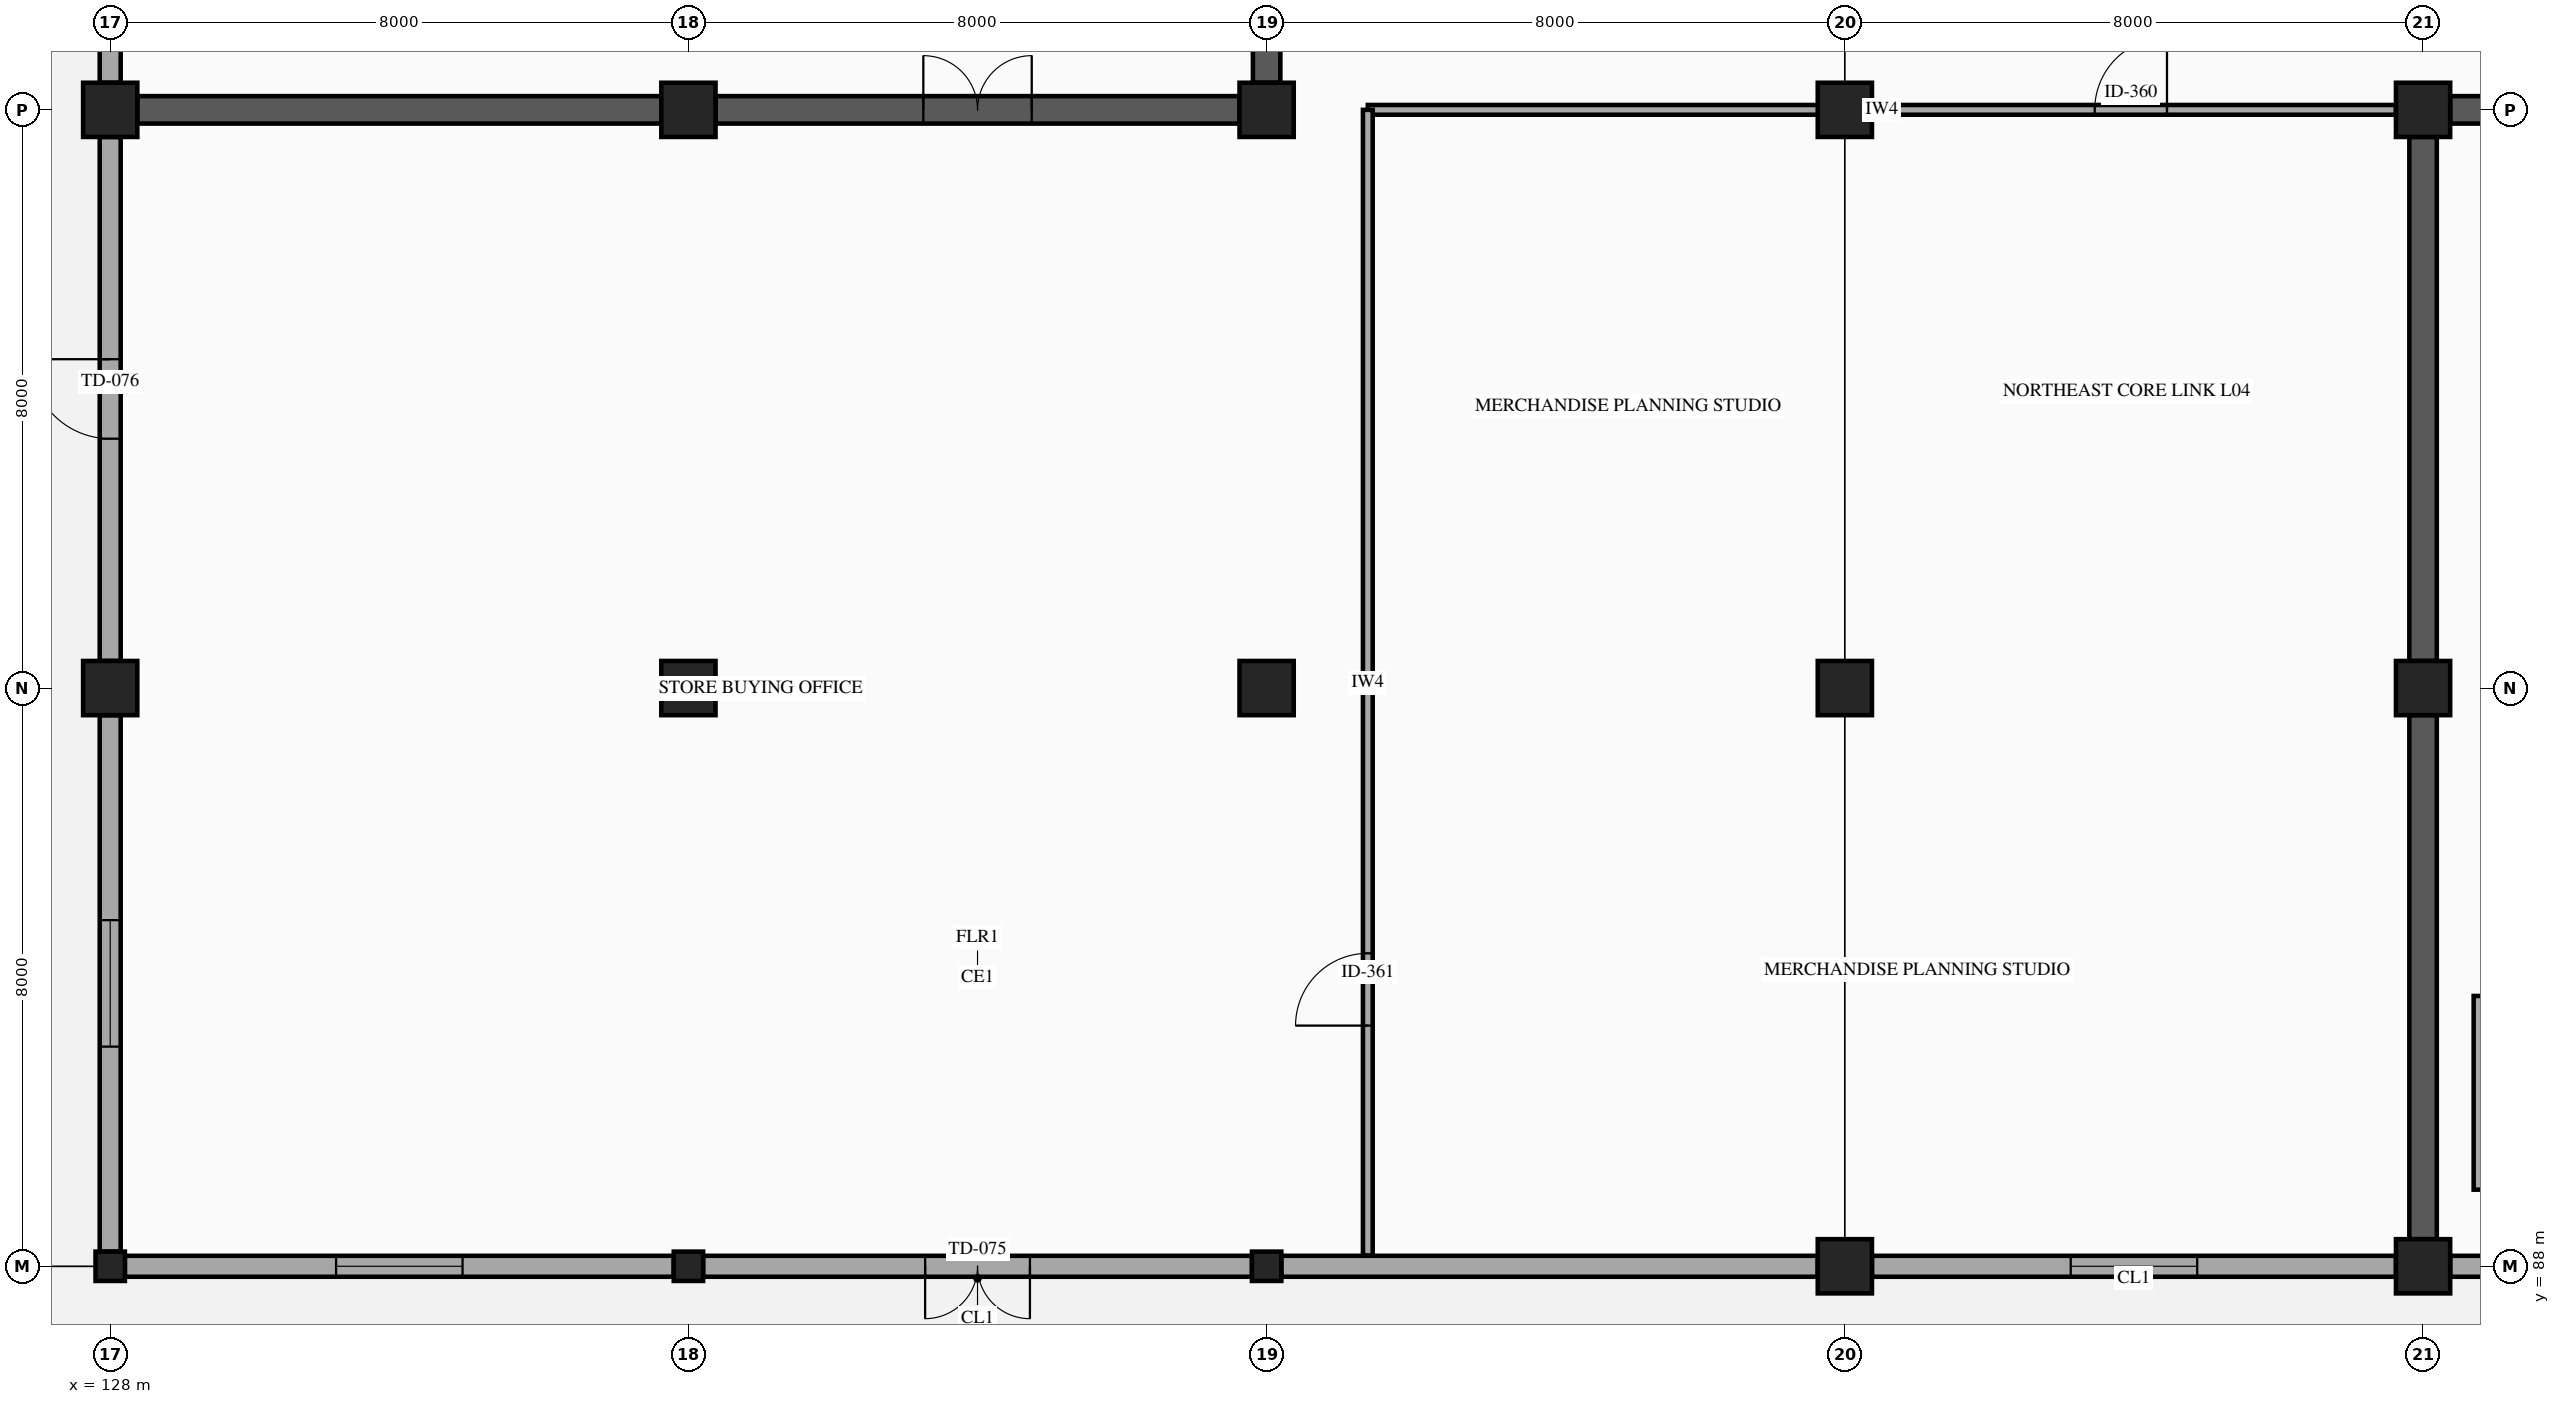
"""IFC4 building model, lengths in metres.
Left out: names, types, materials, properties, quantities, classifications, styles, units other than length and angle.
Written with IfcOpenShell. Run it as: python <this file> out.ifc"""

import sys

from ifc_helpers import new_model, si_unit, direction, frame, frame_2d, origin, origin_2d, place, context, subcontext, project, spatial, rectangle, hollow_circle, extrude, element, fill, save


model = new_model("IFC4")
c1 = context("Model", 3, precision=1e-05, world=origin(), true_north=direction((0.0, 1.0)))
c2 = subcontext(c1, "Body", "Model", "MODEL_VIEW")
j1 = project(units=[si_unit("LENGTHUNIT", "METRE"), si_unit("PLANEANGLEUNIT", "RADIAN")], contexts=[c1])
p1 = place(None, origin())
s1 = spatial("IfcSite", under=j1, at=p1, CompositionType="ELEMENT")
p2 = place(p1, origin())
s2 = spatial("IfcBuilding", under=s1, at=p2, CompositionType="ELEMENT")
p3 = place(p2, frame((0.0, 0.0, 19.4)))
s3 = spatial("IfcBuildingStorey", under=s2, at=p3, CompositionType="ELEMENT", Elevation=19.4)
p4 = place(p3, frame((128.0, 88.0, 0.0), z_axis=(0.0, 0.0, 1.0), x_axis=(1.0, 0.0, 0.0)))
e1 = element("IfcColumn", 1, at=p4, inside=s3, PredefinedType="COLUMN", context=c2, shape_type="SweptSolid", body=[
    extrude(hollow_circle(Radius=0.203, WallThickness=0.012, at=origin_2d()), origin(), (0.0, 0.0, 1.0), 4.5),
])
for number, where, z_axis, x_axis in (
    (2, (128.0, 96.0, 0.0), (0.0, 0.0, 1.0), (1.0, 0.0, 0.0)),
    (3, (128.0, 104.0, 0.0), (0.0, 0.0, 1.0), (1.0, 0.0, 0.0)),
):
    element("IfcColumn", number, at=place(p3, frame(where, z_axis=z_axis, x_axis=x_axis)), inside=s3, PredefinedType="COLUMN", context=c2, shape_type="SweptSolid", body=[
        extrude(rectangle(XDim=0.75, YDim=0.75, at=origin_2d()), origin(), (0.0, 0.0, 1.0), 4.5),
    ])
p5 = place(p3, frame((136.0, 88.0, 0.0), z_axis=(0.0, 0.0, 1.0), x_axis=(1.0, 0.0, 0.0)))
e4 = element("IfcColumn", 4, at=p5, inside=s3, PredefinedType="COLUMN", context=c2, shape_type="SweptSolid", body=[
    extrude(hollow_circle(Radius=0.203, WallThickness=0.012, at=origin_2d()), origin(), (0.0, 0.0, 1.0), 4.5),
])
for number, where, z_axis, x_axis in (
    (5, (136.0, 96.0, 0.0), (0.0, 0.0, 1.0), (1.0, 0.0, 0.0)),
    (6, (136.0, 104.0, 0.0), (0.0, 0.0, 1.0), (1.0, 0.0, 0.0)),
):
    element("IfcColumn", number, at=place(p3, frame(where, z_axis=z_axis, x_axis=x_axis)), inside=s3, PredefinedType="COLUMN", context=c2, shape_type="SweptSolid", body=[
        extrude(rectangle(XDim=0.75, YDim=0.75, at=origin_2d()), origin(), (0.0, 0.0, 1.0), 4.5),
    ])
p6 = place(p3, frame((144.0, 88.0, 0.0), z_axis=(0.0, 0.0, 1.0), x_axis=(1.0, 0.0, 0.0)))
e7 = element("IfcColumn", 7, at=p6, inside=s3, PredefinedType="COLUMN", context=c2, shape_type="SweptSolid", body=[
    extrude(hollow_circle(Radius=0.203, WallThickness=0.012, at=origin_2d()), origin(), (0.0, 0.0, 1.0), 4.5),
])
for number, where, z_axis, x_axis in (
    (8, (144.0, 96.0, 0.0), (0.0, 0.0, 1.0), (1.0, 0.0, 0.0)),
    (9, (144.0, 104.0, 0.0), (0.0, 0.0, 1.0), (1.0, 0.0, 0.0)),
    (10, (152.0, 88.0, 0.0), (0.0, 0.0, 1.0), (1.0, 0.0, 0.0)),
    (11, (152.0, 96.0, 0.0), (0.0, 0.0, 1.0), (1.0, 0.0, 0.0)),
    (12, (152.0, 104.0, 0.0), (0.0, 0.0, 1.0), (1.0, 0.0, 0.0)),
    (13, (160.0, 88.0, 0.0), (0.0, 0.0, 1.0), (1.0, 0.0, 0.0)),
    (14, (160.0, 96.0, 0.0), (0.0, 0.0, 1.0), (1.0, 0.0, 0.0)),
    (15, (160.0, 104.0, 0.0), (0.0, 0.0, 1.0), (1.0, 0.0, 0.0)),
):
    element("IfcColumn", number, at=place(p3, frame(where, z_axis=z_axis, x_axis=x_axis)), inside=s3, PredefinedType="COLUMN", context=c2, shape_type="SweptSolid", body=[
        extrude(rectangle(XDim=0.75, YDim=0.75, at=origin_2d()), origin(), (0.0, 0.0, 1.0), 4.5),
    ])
p7 = place(p3, frame((167.625, 88.0, 0.0), z_axis=(0.0, 0.0, 1.0), x_axis=(-1.0, 0.0, 0.0)))
e16 = element("IfcWall", 16, at=p7, inside=s3, PredefinedType="STANDARD", context=c2, shape_type="SweptSolid", body=[
    extrude(rectangle(XDim=7.25, YDim=0.29, at=frame_2d((3.625, 0.0))), origin(), (0.0, 0.0, 1.0), 3.48),
])
p8 = place(p3, frame((159.625, 88.0, 0.0), z_axis=(0.0, 0.0, 1.0), x_axis=(-1.0, 0.0, 0.0)))
e17 = element("IfcWall", 17, at=p8, inside=s3, PredefinedType="STANDARD", context=c2, shape_type="SweptSolid", body=[
    extrude(rectangle(XDim=7.25, YDim=0.29, at=frame_2d((3.625, 0.0))), origin(), (0.0, 0.0, 1.0), 3.48),
])
p9 = place(p8, frame((2.75, 0.0, 0.8)))
e18 = element("IfcOpeningElement", 18, at=p9, cuts=e17, PredefinedType="OPENING", context=c2, shape_type="SweptSolid", body=[
    extrude(rectangle(XDim=1.75, YDim=1.5, at=frame_2d((0.875, 0.75))), frame((0.0, 0.155, 0.0), z_axis=(0.0, -1.0, 0.0), x_axis=(1.0, 0.0, 0.0)), (0.0, 0.0, 1.0), 0.31),
])
p10 = place(p3, frame((151.625, 88.0, 0.0), z_axis=(0.0, 0.0, 1.0), x_axis=(-1.0, 0.0, 0.0)))
e19 = element("IfcWall", 19, at=p10, inside=s3, PredefinedType="STANDARD", context=c2, shape_type="SweptSolid", body=[
    extrude(rectangle(XDim=7.422, YDim=0.29, at=frame_2d((3.711, 0.0))), origin(), (0.0, 0.0, 1.0), 3.48),
])
p11 = place(p3, frame((143.797, 88.0, 0.0), z_axis=(0.0, 0.0, 1.0), x_axis=(-1.0, 0.0, 0.0)))
e20 = element("IfcWall", 20, at=p11, inside=s3, PredefinedType="STANDARD", context=c2, shape_type="SweptSolid", body=[
    extrude(rectangle(XDim=7.594, YDim=0.29, at=frame_2d((3.797, 0.0))), origin(), (0.0, 0.0, 1.0), 3.48),
])
p12 = place(p11, frame((3.072, 0.0, 0.0)))
e21 = element("IfcOpeningElement", 21, at=p12, cuts=e20, PredefinedType="OPENING", context=c2, shape_type="SweptSolid", body=[
    extrude(rectangle(XDim=1.45, YDim=2.1, at=frame_2d((0.725, 1.05))), frame((0.0, 0.155, 0.0), z_axis=(0.0, -1.0, 0.0), x_axis=(1.0, 0.0, 0.0)), (0.0, 0.0, 1.0), 0.31),
])
p13 = place(p3, frame((135.797, 88.0, 0.0), z_axis=(0.0, 0.0, 1.0), x_axis=(-1.0, 0.0, 0.0)))
e22 = element("IfcWall", 22, at=p13, inside=s3, PredefinedType="STANDARD", context=c2, shape_type="SweptSolid", body=[
    extrude(rectangle(XDim=7.594, YDim=0.29, at=frame_2d((3.797, 0.0))), origin(), (0.0, 0.0, 1.0), 3.48),
])
p14 = place(p13, frame((2.922, 0.0, 0.8)))
e23 = element("IfcOpeningElement", 23, at=p14, cuts=e22, PredefinedType="OPENING", context=c2, shape_type="SweptSolid", body=[
    extrude(rectangle(XDim=1.75, YDim=1.5, at=frame_2d((0.875, 0.75))), frame((0.0, 0.155, 0.0), z_axis=(0.0, -1.0, 0.0), x_axis=(1.0, 0.0, 0.0)), (0.0, 0.0, 1.0), 0.31),
])
p15 = place(p3, frame((128.0, 88.203, 0.0), z_axis=(0.0, 0.0, 1.0), x_axis=(0.0, 1.0, 0.0)))
e24 = element("IfcWall", 24, at=p15, inside=s3, PredefinedType="STANDARD", context=c2, shape_type="SweptSolid", body=[
    extrude(rectangle(XDim=7.422, YDim=0.29, at=frame_2d((3.711, 0.0))), origin(), (0.0, 0.0, 1.0), 3.48),
])
p16 = place(p15, frame((2.836, 0.0, 0.8)))
e25 = element("IfcOpeningElement", 25, at=p16, cuts=e24, PredefinedType="OPENING", context=c2, shape_type="SweptSolid", body=[
    extrude(rectangle(XDim=1.75, YDim=1.5, at=frame_2d((0.875, 0.75))), frame((0.0, 0.155, 0.0), z_axis=(0.0, -1.0, 0.0), x_axis=(1.0, 0.0, 0.0)), (0.0, 0.0, 1.0), 0.31),
])
p17 = place(p3, frame((128.0, 96.375, 0.0), z_axis=(0.0, 0.0, 1.0), x_axis=(0.0, 1.0, 0.0)))
e26 = element("IfcWall", 26, at=p17, inside=s3, PredefinedType="STANDARD", context=c2, shape_type="SweptSolid", body=[
    extrude(rectangle(XDim=7.25, YDim=0.29, at=frame_2d((3.625, 0.0))), origin(), (0.0, 0.0, 1.0), 3.48),
])
p18 = place(p17, frame((3.075, 0.0, 0.0)))
e27 = element("IfcOpeningElement", 27, at=p18, cuts=e26, PredefinedType="OPENING", context=c2, shape_type="SweptSolid", body=[
    extrude(rectangle(XDim=1.1, YDim=2.15, at=frame_2d((0.55, 1.075))), frame((0.0, 0.155, 0.0), z_axis=(0.0, -1.0, 0.0), x_axis=(1.0, 0.0, 0.0)), (0.0, 0.0, 1.0), 0.31),
])
p19 = place(p3, frame((128.0, 104.375, 0.0), z_axis=(0.0, 0.0, 1.0), x_axis=(0.0, 1.0, 0.0)))
e28 = element("IfcWall", 28, at=p19, inside=s3, PredefinedType="STANDARD", context=c2, shape_type="SweptSolid", body=[
    extrude(rectangle(XDim=7.25, YDim=0.29, at=frame_2d((3.625, 0.0))), origin(), (0.0, 0.0, 1.0), 3.48),
])
p20 = place(p3, frame((128.375, 104.0, 0.0), z_axis=(0.0, 0.0, 1.0), x_axis=(1.0, 0.0, 0.0)))
e29 = element("IfcWall", 29, at=p20, inside=s3, PredefinedType="SHEAR", context=c2, shape_type="SweptSolid", body=[
    extrude(rectangle(XDim=7.25, YDim=0.38, at=frame_2d((3.625, 0.0))), origin(), (0.0, 0.0, 1.0), 4.28),
])
p21 = place(p3, frame((136.375, 104.0, 0.0), z_axis=(0.0, 0.0, 1.0), x_axis=(1.0, 0.0, 0.0)))
e30 = element("IfcWall", 30, at=p21, inside=s3, PredefinedType="SHEAR", context=c2, shape_type="SweptSolid", body=[
    extrude(rectangle(XDim=7.25, YDim=0.38, at=frame_2d((3.625, 0.0))), origin(), (0.0, 0.0, 1.0), 4.28),
])
p22 = place(p21, frame((2.875, 0.0, 0.0)))
e31 = element("IfcOpeningElement", 31, at=p22, cuts=e30, PredefinedType="OPENING", context=c2, shape_type="SweptSolid", body=[
    extrude(rectangle(XDim=1.5, YDim=2.15, at=frame_2d((0.75, 1.075))), frame((0.0, 0.2, 0.0), z_axis=(0.0, -1.0, 0.0), x_axis=(1.0, 0.0, 0.0)), (0.0, 0.0, 1.0), 0.4),
])
p23 = place(p3, frame((144.0, 104.375, 0.0), z_axis=(0.0, 0.0, 1.0), x_axis=(0.0, 1.0, 0.0)))
e32 = element("IfcWall", 32, at=p23, inside=s3, PredefinedType="SHEAR", context=c2, shape_type="SweptSolid", body=[
    extrude(rectangle(XDim=7.25, YDim=0.38, at=frame_2d((3.625, 0.0))), origin(), (0.0, 0.0, 1.0), 4.28),
])
p24 = place(p23, frame((1.838, 0.0, 0.0)))
e33 = element("IfcOpeningElement", 33, at=p24, cuts=e32, PredefinedType="OPENING", context=c2, shape_type="SweptSolid", body=[
    extrude(rectangle(XDim=1.5, YDim=2.15, at=frame_2d((0.75, 1.075))), frame((0.0, 0.2, 0.0), z_axis=(0.0, -1.0, 0.0), x_axis=(1.0, 0.0, 0.0)), (0.0, 0.0, 1.0), 0.4),
])
for number, where, z_axis, x_axis in (
    (34, (160.375, 104.0, 0.0), (0.0, 0.0, 1.0), (1.0, 0.0, 0.0)),
    (35, (160.0, 88.375, 0.0), (0.0, 0.0, 1.0), (0.0, 1.0, 0.0)),
    (36, (160.0, 96.375, 0.0), (0.0, 0.0, 1.0), (0.0, 1.0, 0.0)),
):
    element("IfcWall", number, at=place(p3, frame(where, z_axis=z_axis, x_axis=x_axis)), inside=s3, PredefinedType="SHEAR", context=c2, shape_type="SweptSolid", body=[
        extrude(rectangle(XDim=7.25, YDim=0.38, at=frame_2d((3.625, 0.0))), origin(), (0.0, 0.0, 1.0), 4.28),
    ])
p25 = place(p3, frame((160.82, 89.06, 0.0), z_axis=(0.0, 0.0, 1.0), x_axis=(0.0, 1.0, 0.0)))
e37 = element("IfcWall", 37, at=p25, inside=s3, PredefinedType="PARTITIONING", context=c2, shape_type="SweptSolid", body=[
    extrude(rectangle(XDim=2.68, YDim=0.24, at=frame_2d((1.34, 0.0))), origin(), (0.0, 0.0, 1.0), 4.28),
])
p26 = place(p3, frame((145.4, 104.0, 0.0), z_axis=(0.0, 0.0, 1.0), x_axis=(1.0, 0.0, 0.0)))
e38 = element("IfcWall", 38, at=p26, inside=s3, PredefinedType="PARTITIONING", context=c2, shape_type="SweptSolid", body=[
    extrude(rectangle(XDim=14.225, YDim=0.135, at=frame_2d((7.113, 0.0))), origin(), (0.0, 0.0, 1.0), 3.48),
])
p27 = place(p26, frame((10.057, 0.0, 0.0)))
e39 = element("IfcOpeningElement", 39, at=p27, cuts=e38, PredefinedType="OPENING", context=c2, shape_type="SweptSolid", body=[
    extrude(rectangle(XDim=1.0, YDim=2.15, at=frame_2d((0.5, 1.075))), frame((0.0, 0.077, 0.0), z_axis=(0.0, -1.0, 0.0), x_axis=(1.0, 0.0, 0.0)), (0.0, 0.0, 1.0), 0.155),
])
p28 = place(p3, frame((145.4, 88.15, 0.0), z_axis=(0.0, 0.0, 1.0), x_axis=(0.0, 1.0, 0.0)))
e40 = element("IfcWall", 40, at=p28, inside=s3, PredefinedType="PARTITIONING", context=c2, shape_type="SweptSolid", body=[
    extrude(rectangle(XDim=15.85, YDim=0.135, at=frame_2d((7.925, 0.0))), origin(), (0.0, 0.0, 1.0), 3.48),
])
p29 = place(p28, frame((3.18, 0.0, 0.0)))
e41 = element("IfcOpeningElement", 41, at=p29, cuts=e40, PredefinedType="OPENING", context=c2, shape_type="SweptSolid", body=[
    extrude(rectangle(XDim=1.0, YDim=2.15, at=frame_2d((0.5, 1.075))), frame((0.0, 0.077, 0.0), z_axis=(0.0, -1.0, 0.0), x_axis=(1.0, 0.0, 0.0)), (0.0, 0.0, 1.0), 0.155),
])
p30 = place(p9, origin())
e42 = element("IfcWindow", 42, at=p30, inside=s3, PartitioningType="SINGLE_PANEL", PredefinedType="WINDOW", context=c2, shape_type="SweptSolid", body=[
    extrude(rectangle(XDim=1.75, YDim=1.5, at=frame_2d((0.875, 0.75))), frame((0.0, 0.03, 0.0), z_axis=(0.0, -1.0, 0.0), x_axis=(1.0, 0.0, 0.0)), (0.0, 0.0, 1.0), 0.06),
])
fill(e18, e42)
p31 = place(p12, origin())
e43 = element("IfcDoor", 43, at=p31, inside=s3, OperationType="DOUBLE_DOOR_SINGLE_SWING", PredefinedType="DOOR", context=c2, shape_type="SweptSolid", body=[
    extrude(rectangle(XDim=1.45, YDim=2.1, at=frame_2d((0.725, 1.05))), frame((0.0, 0.025, 0.0), z_axis=(0.0, -1.0, 0.0), x_axis=(1.0, 0.0, 0.0)), (0.0, 0.0, 1.0), 0.05),
])
fill(e21, e43)
p32 = place(p14, origin())
e44 = element("IfcWindow", 44, at=p32, inside=s3, PartitioningType="SINGLE_PANEL", PredefinedType="WINDOW", context=c2, shape_type="SweptSolid", body=[
    extrude(rectangle(XDim=1.75, YDim=1.5, at=frame_2d((0.875, 0.75))), frame((0.0, 0.03, 0.0), z_axis=(0.0, -1.0, 0.0), x_axis=(1.0, 0.0, 0.0)), (0.0, 0.0, 1.0), 0.06),
])
fill(e23, e44)
p33 = place(p16, origin())
e45 = element("IfcWindow", 45, at=p33, inside=s3, PartitioningType="SINGLE_PANEL", PredefinedType="WINDOW", context=c2, shape_type="SweptSolid", body=[
    extrude(rectangle(XDim=1.75, YDim=1.5, at=frame_2d((0.875, 0.75))), frame((0.0, 0.03, 0.0), z_axis=(0.0, -1.0, 0.0), x_axis=(1.0, 0.0, 0.0)), (0.0, 0.0, 1.0), 0.06),
])
fill(e25, e45)
p34 = place(p18, origin())
e46 = element("IfcDoor", 46, at=p34, inside=s3, OperationType="SINGLE_SWING_RIGHT", PredefinedType="DOOR", context=c2, shape_type="SweptSolid", body=[
    extrude(rectangle(XDim=1.1, YDim=2.15, at=frame_2d((0.55, 1.075))), frame((0.0, 0.025, 0.0), z_axis=(0.0, -1.0, 0.0), x_axis=(1.0, 0.0, 0.0)), (0.0, 0.0, 1.0), 0.05),
])
fill(e27, e46)
p35 = place(p22, origin())
e47 = element("IfcDoor", 47, at=p35, inside=s3, OperationType="DOUBLE_DOOR_SINGLE_SWING", PredefinedType="DOOR", context=c2, shape_type="SweptSolid", body=[
    extrude(rectangle(XDim=1.5, YDim=2.15, at=frame_2d((0.75, 1.075))), frame((0.0, 0.025, 0.0), z_axis=(0.0, -1.0, 0.0), x_axis=(1.0, 0.0, 0.0)), (0.0, 0.0, 1.0), 0.05),
])
fill(e31, e47)
p36 = place(p27, origin())
e48 = element("IfcDoor", 48, at=p36, inside=s3, OperationType="SINGLE_SWING_RIGHT", PredefinedType="DOOR", context=c2, shape_type="SweptSolid", body=[
    extrude(rectangle(XDim=1.0, YDim=2.15, at=frame_2d((0.5, 1.075))), frame((0.0, 0.025, 0.0), z_axis=(0.0, -1.0, 0.0), x_axis=(1.0, 0.0, 0.0)), (0.0, 0.0, 1.0), 0.05),
])
fill(e39, e48)
p37 = place(p29, origin())
e49 = element("IfcDoor", 49, at=p37, inside=s3, OperationType="SINGLE_SWING_LEFT", PredefinedType="DOOR", context=c2, shape_type="SweptSolid", body=[
    extrude(rectangle(XDim=1.0, YDim=2.15, at=frame_2d((0.5, 1.075))), frame((0.0, 0.025, 0.0), z_axis=(0.0, -1.0, 0.0), x_axis=(1.0, 0.0, 0.0)), (0.0, 0.0, 1.0), 0.05),
])
fill(e41, e49)
save(model, sys.argv[1])
